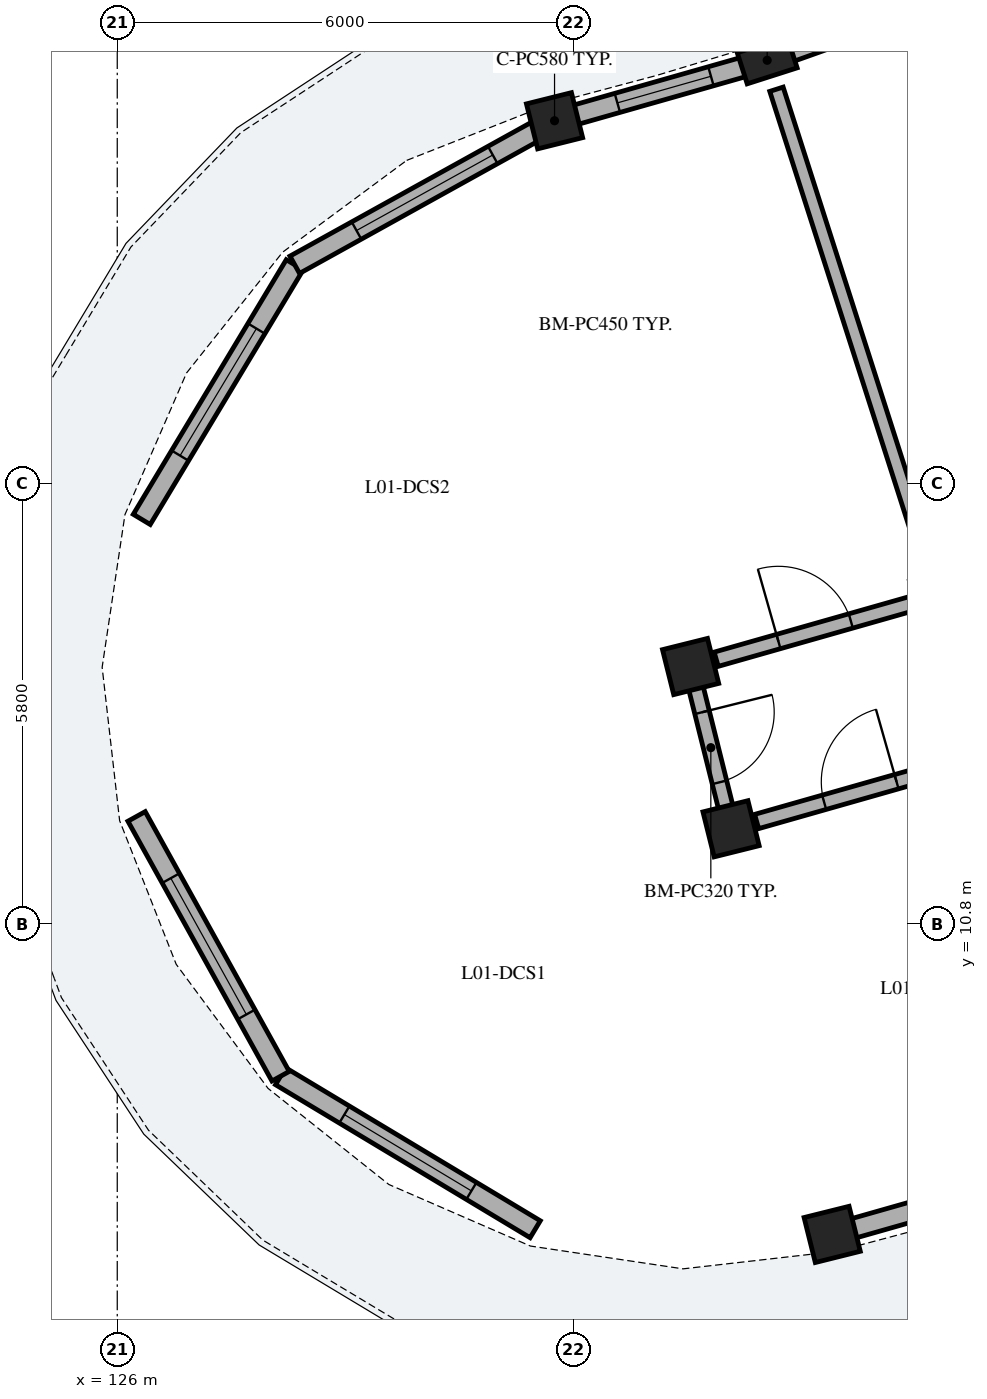
"""IFC4 building model, lengths in metres.
Left out: names, types, materials, properties, quantities, classifications, styles, units other than length and angle.
Written with IfcOpenShell. Run it as: python <this file> out.ifc"""

import sys

from ifc_helpers import new_model, si_unit, direction, frame, frame_2d, origin, origin_2d, place, context, subcontext, project, spatial, rectangle, extrude, element, fill, save


model = new_model("IFC4")
c1 = context("Model", 3, precision=1e-05, world=origin(), true_north=direction((0.0, 1.0)))
c2 = subcontext(c1, "Body", "Model", "MODEL_VIEW")
j1 = project(units=[si_unit("LENGTHUNIT", "METRE"), si_unit("PLANEANGLEUNIT", "RADIAN")], contexts=[c1])
p1 = place(None, origin())
s1 = spatial("IfcSite", under=j1, at=p1, CompositionType="ELEMENT")
p2 = place(p1, origin())
s2 = spatial("IfcBuilding", under=s1, at=p2, CompositionType="ELEMENT")
p3 = place(p2, frame((0.0, 0.0, 4.76)))
s3 = spatial("IfcBuildingStorey", under=s2, at=p3, CompositionType="ELEMENT", Elevation=4.76)
for number, where, z_axis, x_axis in (
    (1, (131.753, 21.37, 0.0), (0.0, 0.0, 1.0), (0.242, -0.97, 0.0)),
    (2, (133.544, 14.19, 0.0), (0.0, 0.0, 1.0), (0.242, -0.97, 0.0)),
    (3, (134.076, 12.055, 0.0), (0.0, 0.0, 1.0), (0.242, -0.97, 0.0)),
    (4, (135.406, 6.719, 0.0), (0.0, 0.0, 1.0), (0.242, -0.97, 0.0)),
):
    element("IfcColumn", number, at=place(p3, frame(where, z_axis=z_axis, x_axis=x_axis)), inside=s3, PredefinedType="COLUMN", context=c2, shape_type="SweptSolid", body=[
        extrude(rectangle(XDim=0.61, YDim=0.61, at=origin_2d()), origin(), (0.0, 0.0, 1.0), 3.825),
    ])
p4 = place(p3, frame((134.551, 22.166, 0.0), z_axis=(0.0, 0.0, 1.0), x_axis=(0.304864299028, -0.952395799643, 0.0)))
e5 = element("IfcColumn", 5, at=p4, inside=s3, PredefinedType="PILASTER", context=c2, shape_type="SweptSolid", body=[
    extrude(rectangle(XDim=0.43, YDim=0.69, at=origin_2d()), origin(), (0.0, 0.0, 1.0), 3.825),
])
p5 = place(p3, frame((135.671, 6.794, 0.0), z_axis=(0.0, 0.0, 1.0), x_axis=(0.961876981915, 0.273482488766, 0.0)))
e6 = element("IfcWall", 6, at=p5, inside=s3, PredefinedType="SOLIDWALL", context=c2, shape_type="SweptSolid", body=[
    extrude(rectangle(XDim=3.437, YDim=0.26, at=frame_2d((1.719, 0.0))), origin(), (0.0, 0.0, 1.0), 3.075),
])
p6 = place(p5, frame((1.078, 0.0, 0.55)))
e7 = element("IfcOpeningElement", 7, at=p6, cuts=e6, PredefinedType="OPENING", context=c2, shape_type="SweptSolid", body=[
    extrude(rectangle(XDim=1.28, YDim=1.52, at=frame_2d((0.64, 0.76))), frame((0.0, 0.14, 0.0), z_axis=(0.0, -1.0, 0.0), x_axis=(1.0, 0.0, 0.0)), (0.0, 0.0, 1.0), 0.28),
])
p7 = place(p3, frame((132.018, 21.446, 0.0), z_axis=(0.0, 0.0, 1.0), x_axis=(0.961854311059, 0.273562212847, 0.0)))
e8 = element("IfcWall", 8, at=p7, inside=s3, PredefinedType="SOLIDWALL", context=c2, shape_type="SweptSolid", body=[
    extrude(rectangle(XDim=2.449, YDim=0.26, at=frame_2d((1.225, 0.0))), origin(), (0.0, 0.0, 1.0), 3.075),
])
p8 = place(p7, frame((0.584, 0.0, 0.55)))
e9 = element("IfcOpeningElement", 9, at=p8, cuts=e8, PredefinedType="OPENING", context=c2, shape_type="SweptSolid", body=[
    extrude(rectangle(XDim=1.28, YDim=1.56, at=frame_2d((0.64, 0.78))), frame((0.0, 0.14, 0.0), z_axis=(0.0, -1.0, 0.0), x_axis=(1.0, 0.0, 0.0)), (0.0, 0.0, 1.0), 0.28),
])
p9 = place(p3, frame((134.726, 22.228, 0.0), z_axis=(0.0, 0.0, 1.0), x_axis=(0.941897456242, 0.335900553623, 0.0)))
e10 = element("IfcWall", 10, at=p9, inside=s3, PredefinedType="SOLIDWALL", context=c2, shape_type="SweptSolid", body=[
    extrude(rectangle(XDim=2.449, YDim=0.26, at=frame_2d((1.224, 0.0))), origin(), (0.0, 0.0, 1.0), 3.075),
])
p10 = place(p9, frame((0.524, 0.0, 0.55)))
e11 = element("IfcOpeningElement", 11, at=p10, cuts=e10, PredefinedType="OPENING", context=c2, shape_type="SweptSolid", body=[
    extrude(rectangle(XDim=1.4, YDim=1.635, at=frame_2d((0.7, 0.817))), frame((0.0, 0.14, 0.0), z_axis=(0.0, -1.0, 0.0), x_axis=(1.0, 0.0, 0.0)), (0.0, 0.0, 1.0), 0.28),
])
p11 = place(p3, frame((131.499, 6.787, 0.0), z_axis=(0.0, 0.0, 1.0), x_axis=(-0.85715098885, 0.515065221417, 0.0)))
e12 = element("IfcWall", 12, at=p11, inside=s3, PredefinedType="SOLIDWALL", context=c2, shape_type="SweptSolid", body=[
    extrude(rectangle(XDim=3.908, YDim=0.26, at=frame_2d((1.954, 0.0))), origin(), (0.0, 0.0, 1.0), 3.075),
])
p12 = place(p11, frame((0.979, 0.0, 0.4)))
e13 = element("IfcOpeningElement", 13, at=p12, cuts=e12, PredefinedType="OPENING", context=c2, shape_type="SweptSolid", body=[
    extrude(rectangle(XDim=1.95, YDim=1.78, at=frame_2d((0.975, 0.89))), frame((0.0, 0.14, 0.0), z_axis=(0.0, -1.0, 0.0), x_axis=(1.0, 0.0, 0.0)), (0.0, 0.0, 1.0), 0.28),
])
p13 = place(p3, frame((128.149, 8.8, 0.0), z_axis=(0.0, 0.0, 1.0), x_axis=(-0.484841794757, 0.874601871743, 0.0)))
e14 = element("IfcWall", 14, at=p13, inside=s3, PredefinedType="SOLIDWALL", context=c2, shape_type="SweptSolid", body=[
    extrude(rectangle(XDim=3.908, YDim=0.26, at=frame_2d((1.954, 0.0))), origin(), (0.0, 0.0, 1.0), 3.075),
])
p14 = place(p13, frame((0.929, 0.0, 0.4)))
e15 = element("IfcOpeningElement", 15, at=p14, cuts=e14, PredefinedType="OPENING", context=c2, shape_type="SweptSolid", body=[
    extrude(rectangle(XDim=2.05, YDim=1.82, at=frame_2d((1.025, 0.91))), frame((0.0, 0.14, 0.0), z_axis=(0.0, -1.0, 0.0), x_axis=(1.0, 0.0, 0.0)), (0.0, 0.0, 1.0), 0.28),
])
p15 = place(p3, frame((126.323, 16.126, 0.0), z_axis=(0.0, 0.0, 1.0), x_axis=(0.515019321998, 0.857178568309, 0.0)))
e16 = element("IfcWall", 16, at=p15, inside=s3, PredefinedType="SOLIDWALL", context=c2, shape_type="SweptSolid", body=[
    extrude(rectangle(XDim=3.908, YDim=0.26, at=frame_2d((1.954, 0.0))), origin(), (0.0, 0.0, 1.0), 3.075),
])
p16 = place(p15, frame((0.979, 0.0, 0.4)))
e17 = element("IfcOpeningElement", 17, at=p16, cuts=e16, PredefinedType="OPENING", context=c2, shape_type="SweptSolid", body=[
    extrude(rectangle(XDim=1.95, YDim=1.78, at=frame_2d((0.975, 0.89))), frame((0.0, 0.14, 0.0), z_axis=(0.0, -1.0, 0.0), x_axis=(1.0, 0.0, 0.0)), (0.0, 0.0, 1.0), 0.28),
])
p17 = place(p3, frame((128.335, 19.476, 0.0), z_axis=(0.0, 0.0, 1.0), x_axis=(0.874616555828, 0.48481530532, 0.0)))
e18 = element("IfcWall", 18, at=p17, inside=s3, PredefinedType="SOLIDWALL", context=c2, shape_type="SweptSolid", body=[
    extrude(rectangle(XDim=3.908, YDim=0.26, at=frame_2d((1.954, 0.0))), origin(), (0.0, 0.0, 1.0), 3.075),
])
p18 = place(p17, frame((0.929, 0.0, 0.4)))
e19 = element("IfcOpeningElement", 19, at=p18, cuts=e18, PredefinedType="OPENING", context=c2, shape_type="SweptSolid", body=[
    extrude(rectangle(XDim=2.05, YDim=1.82, at=frame_2d((1.025, 0.91))), frame((0.0, 0.14, 0.0), z_axis=(0.0, -1.0, 0.0), x_axis=(1.0, 0.0, 0.0)), (0.0, 0.0, 1.0), 0.28),
])
p19 = place(p3, frame((134.413, 12.151, 0.0), z_axis=(0.0, 0.0, 1.0), x_axis=(0.961873892319, 0.273493355085, 0.0)))
e20 = element("IfcWall", 20, at=p19, inside=s3, PredefinedType="PARTITIONING", context=c2, shape_type="SweptSolid", body=[
    extrude(rectangle(XDim=2.837, YDim=0.195, at=frame_2d((1.418, 0.0))), origin(), (0.0, 0.0, 1.0), 3.09),
])
p20 = place(p19, frame((0.924, 0.0, 0.0)))
e21 = element("IfcOpeningElement", 21, at=p20, cuts=e20, PredefinedType="OPENING", context=c2, shape_type="SweptSolid", body=[
    extrude(rectangle(XDim=0.99, YDim=2.16, at=frame_2d((0.495, 1.08))), frame((0.0, 0.107, 0.0), z_axis=(0.0, -1.0, 0.0), x_axis=(1.0, 0.0, 0.0)), (0.0, 0.0, 1.0), 0.215),
])
p21 = place(p3, frame((133.88, 14.286, 0.0), z_axis=(0.0, 0.0, 1.0), x_axis=(0.961861926514, 0.273535435224, 0.0)))
e22 = element("IfcWall", 22, at=p21, inside=s3, PredefinedType="PARTITIONING", context=c2, shape_type="SweptSolid", body=[
    extrude(rectangle(XDim=2.693, YDim=0.195, at=frame_2d((1.346, 0.0))), origin(), (0.0, 0.0, 1.0), 3.09),
])
p22 = place(p21, frame((0.852, 0.0, 0.0)))
e23 = element("IfcOpeningElement", 23, at=p22, cuts=e22, PredefinedType="OPENING", context=c2, shape_type="SweptSolid", body=[
    extrude(rectangle(XDim=0.99, YDim=2.16, at=frame_2d((0.495, 1.08))), frame((0.0, 0.107, 0.0), z_axis=(0.0, -1.0, 0.0), x_axis=(1.0, 0.0, 0.0)), (0.0, 0.0, 1.0), 0.215),
])
p23 = place(p3, frame((134.673, 21.785, 0.0), z_axis=(0.0, 0.0, 1.0), x_axis=(0.304875046605, -0.95239235925, 0.0)))
e24 = element("IfcWall", 24, at=p23, inside=s3, PredefinedType="PARTITIONING", context=c2, shape_type="SweptSolid", body=[
    extrude(rectangle(XDim=6.6, YDim=0.185, at=frame_2d((3.3, 0.0))), origin(), (0.0, 0.0, 1.0), 3.09),
])
p24 = place(p3, frame((133.556, 14.142, 0.0), z_axis=(0.0, 0.0, 1.0), x_axis=(0.241933770084, -0.970292765557, 0.0)))
e25 = element("IfcWall", 25, at=p24, inside=s3, PredefinedType="PARTITIONING", context=c2, shape_type="SweptSolid", body=[
    extrude(rectangle(XDim=2.1, YDim=0.195, at=frame_2d((1.05, 0.0))), origin(), (0.0, 0.0, 1.0), 3.09),
])
p25 = place(p24, frame((0.57, 0.0, 0.0)))
e26 = element("IfcOpeningElement", 26, at=p25, cuts=e25, PredefinedType="OPENING", context=c2, shape_type="SweptSolid", body=[
    extrude(rectangle(XDim=0.95, YDim=2.13, at=frame_2d((0.475, 1.065))), frame((0.0, 0.107, 0.0), z_axis=(0.0, -1.0, 0.0), x_axis=(1.0, 0.0, 0.0)), (0.0, 0.0, 1.0), 0.215),
])
p26 = place(p8, origin())
e27 = element("IfcWindow", 27, at=p26, inside=s3, PartitioningType="SINGLE_PANEL", PredefinedType="WINDOW", context=c2, shape_type="SweptSolid", body=[
    extrude(rectangle(XDim=1.28, YDim=1.56, at=frame_2d((0.64, 0.78))), frame((0.0, 0.03, 0.0), z_axis=(0.0, -1.0, 0.0), x_axis=(1.0, 0.0, 0.0)), (0.0, 0.0, 1.0), 0.06),
])
fill(e9, e27)
p27 = place(p12, origin())
e28 = element("IfcWindow", 28, at=p27, inside=s3, PartitioningType="SINGLE_PANEL", PredefinedType="WINDOW", context=c2, shape_type="SweptSolid", body=[
    extrude(rectangle(XDim=1.95, YDim=1.78, at=frame_2d((0.975, 0.89))), frame((0.0, 0.03, 0.0), z_axis=(0.0, -1.0, 0.0), x_axis=(1.0, 0.0, 0.0)), (0.0, 0.0, 1.0), 0.06),
])
fill(e13, e28)
p28 = place(p14, origin())
e29 = element("IfcWindow", 29, at=p28, inside=s3, PartitioningType="SINGLE_PANEL", PredefinedType="WINDOW", context=c2, shape_type="SweptSolid", body=[
    extrude(rectangle(XDim=2.05, YDim=1.82, at=frame_2d((1.025, 0.91))), frame((0.0, 0.03, 0.0), z_axis=(0.0, -1.0, 0.0), x_axis=(1.0, 0.0, 0.0)), (0.0, 0.0, 1.0), 0.06),
])
fill(e15, e29)
p29 = place(p16, origin())
e30 = element("IfcWindow", 30, at=p29, inside=s3, PartitioningType="SINGLE_PANEL", PredefinedType="WINDOW", context=c2, shape_type="SweptSolid", body=[
    extrude(rectangle(XDim=1.95, YDim=1.78, at=frame_2d((0.975, 0.89))), frame((0.0, 0.03, 0.0), z_axis=(0.0, -1.0, 0.0), x_axis=(1.0, 0.0, 0.0)), (0.0, 0.0, 1.0), 0.06),
])
fill(e17, e30)
p30 = place(p18, origin())
e31 = element("IfcWindow", 31, at=p30, inside=s3, PartitioningType="SINGLE_PANEL", PredefinedType="WINDOW", context=c2, shape_type="SweptSolid", body=[
    extrude(rectangle(XDim=2.05, YDim=1.82, at=frame_2d((1.025, 0.91))), frame((0.0, 0.03, 0.0), z_axis=(0.0, -1.0, 0.0), x_axis=(1.0, 0.0, 0.0)), (0.0, 0.0, 1.0), 0.06),
])
fill(e19, e31)
p31 = place(p20, origin())
e32 = element("IfcDoor", 32, at=p31, inside=s3, OperationType="SINGLE_SWING_RIGHT", PredefinedType="DOOR", context=c2, shape_type="SweptSolid", body=[
    extrude(rectangle(XDim=0.99, YDim=2.16, at=frame_2d((0.495, 1.08))), frame((0.0, 0.025, 0.0), z_axis=(0.0, -1.0, 0.0), x_axis=(1.0, 0.0, 0.0)), (0.0, 0.0, 1.0), 0.05),
])
fill(e21, e32)
p32 = place(p22, origin())
e33 = element("IfcDoor", 33, at=p32, inside=s3, OperationType="SINGLE_SWING_LEFT", PredefinedType="DOOR", context=c2, shape_type="SweptSolid", body=[
    extrude(rectangle(XDim=0.99, YDim=2.16, at=frame_2d((0.495, 1.08))), frame((0.0, 0.025, 0.0), z_axis=(0.0, -1.0, 0.0), x_axis=(1.0, 0.0, 0.0)), (0.0, 0.0, 1.0), 0.05),
])
fill(e23, e33)
p33 = place(p25, origin())
e34 = element("IfcDoor", 34, at=p33, inside=s3, OperationType="SINGLE_SWING_LEFT", PredefinedType="DOOR", context=c2, shape_type="SweptSolid", body=[
    extrude(rectangle(XDim=0.95, YDim=2.13, at=frame_2d((0.475, 1.065))), frame((0.0, 0.025, 0.0), z_axis=(0.0, -1.0, 0.0), x_axis=(1.0, 0.0, 0.0)), (0.0, 0.0, 1.0), 0.05),
])
fill(e26, e34)
save(model, sys.argv[1])
